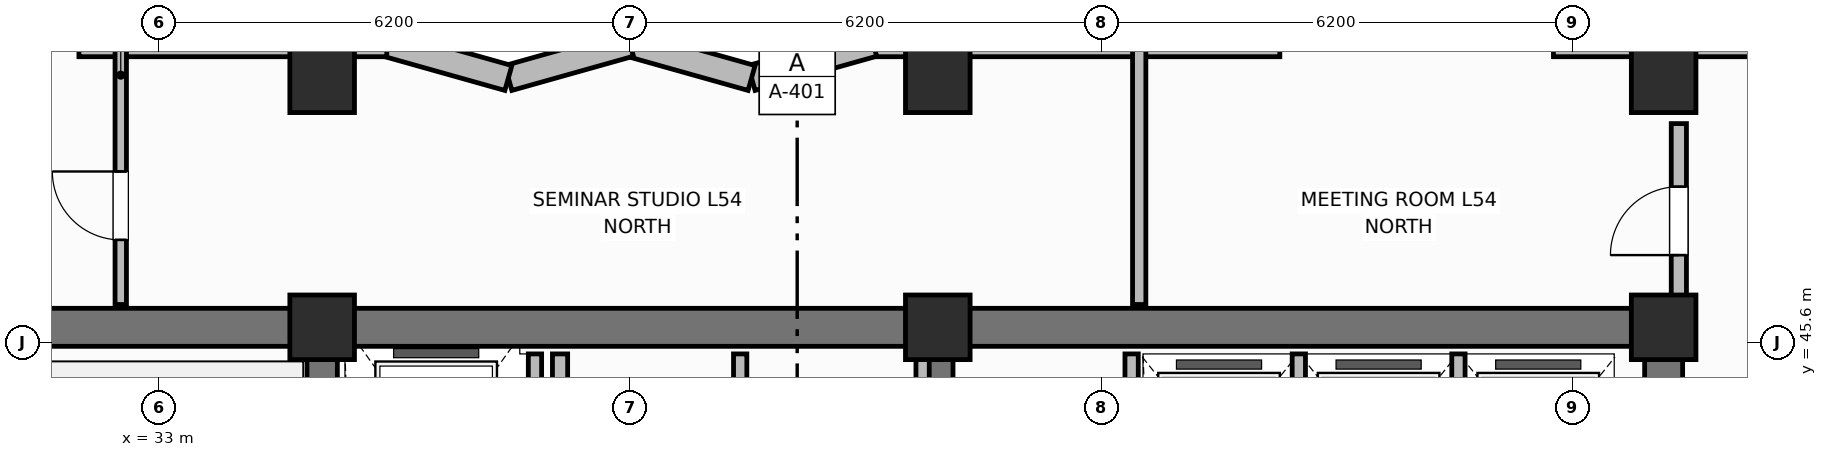
"""IFC4 building model, lengths in metres.
Left out: names, types, materials, properties, quantities, classifications, styles, units other than length and angle.
Written with IfcOpenShell. Run it as: python <this file> out.ifc"""

import sys

from ifc_helpers import new_model, si_unit, direction, frame, frame_2d, origin, origin_2d, place, context, subcontext, project, spatial, rectangle, extrude, element, fill, save


model = new_model("IFC4")
c1 = context("Model", 3, precision=1e-05, world=origin(), true_north=direction((0.0, 1.0)))
c2 = subcontext(c1, "Body", "Model", "MODEL_VIEW")
j1 = project(units=[si_unit("LENGTHUNIT", "METRE"), si_unit("PLANEANGLEUNIT", "RADIAN")], contexts=[c1])
p1 = place(None, origin())
s1 = spatial("IfcSite", under=j1, at=p1, CompositionType="ELEMENT")
p2 = place(p1, origin())
s2 = spatial("IfcBuilding", under=s1, at=p2, CompositionType="ELEMENT")
p3 = place(p2, frame((0.0, 0.0, 218.4)))
s3 = spatial("IfcBuildingStorey", under=s2, at=p3, CompositionType="ELEMENT", Elevation=218.4)
p4 = place(p3, frame((25.6, 45.8, 0.0), z_axis=(0.0, 0.0, 1.0), x_axis=(1.0, 0.0, 0.0)))
e1 = element("IfcWall", 1, at=p4, inside=s3, PredefinedType="SHEAR", context=c2, shape_type="SweptSolid", body=[
    extrude(rectangle(XDim=27.2, YDim=0.5, at=frame_2d((13.6, 0.0))), origin(), (0.0, 0.0, 1.0), 3.7),
])
p5 = place(p3, frame((52.8, 39.85, 0.0), z_axis=(0.0, 0.0, 1.0), x_axis=(0.0, 1.0, 0.0)))
e2 = element("IfcWall", 2, at=p5, inside=s3, PredefinedType="SHEAR", context=c2, shape_type="SweptSolid", body=[
    extrude(rectangle(XDim=5.7, YDim=0.5, at=frame_2d((2.85, 0.0))), origin(), (0.0, 0.0, 1.0), 3.7),
])
for number, where, z_axis, x_axis in (
    (3, (35.15, 39.85, 0.0), (0.0, 0.0, 1.0), (0.0, 1.0, 0.0)),
    (4, (43.25, 39.85, 0.0), (0.0, 0.0, 1.0), (0.0, 1.0, 0.0)),
):
    element("IfcWall", number, at=place(p3, frame(where, z_axis=z_axis, x_axis=x_axis)), inside=s3, PredefinedType="SHEAR", context=c2, shape_type="SweptSolid", body=[
        extrude(rectangle(XDim=5.7, YDim=0.4, at=frame_2d((2.85, 0.0))), origin(), (0.0, 0.0, 1.0), 3.7),
    ])
for number, where, z_axis, x_axis in (
    (5, (35.15, 45.8, 0.0), (0.0, 0.0, 1.0), (1.0, 0.0, 0.0)),
    (6, (43.25, 45.8, 0.0), (0.0, 0.0, 1.0), (1.0, 0.0, 0.0)),
    (7, (52.8, 45.8, 0.0), (0.0, 0.0, 1.0), (1.0, 0.0, 0.0)),
    (8, (35.15, 49.05, 0.0), (0.0, 0.0, 1.0), (1.0, 0.0, 0.0)),
    (9, (43.25, 49.05, 0.0), (0.0, 0.0, 1.0), (1.0, 0.0, 0.0)),
    (10, (52.8, 49.05, 0.0), (0.0, 0.0, 1.0), (1.0, 0.0, 0.0)),
):
    element("IfcColumn", number, at=place(p3, frame(where, z_axis=z_axis, x_axis=x_axis)), inside=s3, PredefinedType="COLUMN", context=c2, shape_type="SweptSolid", body=[
        extrude(rectangle(XDim=0.85, YDim=0.85, at=origin_2d()), origin(), (0.0, 0.0, 1.0), 3.7),
    ])
p6 = place(p3, frame((58.2, 49.53, 0.0), z_axis=(0.0, 0.0, 1.0), x_axis=(-1.0, 0.0, 0.0)))
e11 = element("IfcWall", 11, at=p6, inside=s3, PredefinedType="SOLIDWALL", context=c2, shape_type="SweptSolid", body=[
    extrude(rectangle(XDim=6.85, YDim=0.34, at=frame_2d((3.425, 0.0))), origin(), (0.0, 0.0, 1.0), 2.72),
])
p7 = place(p6, frame((1.675, 0.0, 0.75)))
e12 = element("IfcOpeningElement", 12, at=p7, cuts=e11, PredefinedType="OPENING", context=c2, shape_type="SweptSolid", body=[
    extrude(rectangle(XDim=1.4, YDim=1.85, at=frame_2d((0.7, 0.925))), frame((0.0, 0.18, 0.0), z_axis=(0.0, -1.0, 0.0), x_axis=(1.0, 0.0, 0.0)), (0.0, 0.0, 1.0), 0.36),
])
p8 = place(p3, frame((47.75, 49.53, 0.0), z_axis=(0.0, 0.0, 1.0), x_axis=(-1.0, 0.0, 0.0)))
e13 = element("IfcWall", 13, at=p8, inside=s3, PredefinedType="SOLIDWALL", context=c2, shape_type="SweptSolid", body=[
    extrude(rectangle(XDim=5.35, YDim=0.34, at=frame_2d((2.675, 0.0))), origin(), (0.0, 0.0, 1.0), 2.72),
])
p9 = place(p3, frame((42.4, 49.53, 0.0), z_axis=(0.0, 0.0, 1.0), x_axis=(-0.962652136636, -0.270741322725, 0.0)))
e14 = element("IfcWall", 14, at=p9, inside=s3, PredefinedType="SOLIDWALL", context=c2, shape_type="SweptSolid", body=[
    extrude(rectangle(XDim=1.662, YDim=0.34, at=frame_2d((0.831, 0.0))), origin(), (0.0, 0.0, 1.0), 2.72),
])
p10 = place(p3, frame((40.8, 49.08, 0.0), z_axis=(0.0, 0.0, 1.0), x_axis=(-0.962662902433, 0.270703040766, 0.0)))
e15 = element("IfcWall", 15, at=p10, inside=s3, PredefinedType="SOLIDWALL", context=c2, shape_type="SweptSolid", body=[
    extrude(rectangle(XDim=1.662, YDim=0.34, at=frame_2d((0.831, 0.0))), origin(), (0.0, 0.0, 1.0), 2.72),
])
p11 = place(p3, frame((39.2, 49.53, 0.0), z_axis=(0.0, 0.0, 1.0), x_axis=(-0.962652136636, -0.270741322725, 0.0)))
e16 = element("IfcWall", 16, at=p11, inside=s3, PredefinedType="SOLIDWALL", context=c2, shape_type="SweptSolid", body=[
    extrude(rectangle(XDim=1.662, YDim=0.34, at=frame_2d((0.831, 0.0))), origin(), (0.0, 0.0, 1.0), 2.72),
])
p12 = place(p3, frame((37.6, 49.08, 0.0), z_axis=(0.0, 0.0, 1.0), x_axis=(-0.962662902433, 0.270703040766, 0.0)))
e17 = element("IfcWall", 17, at=p12, inside=s3, PredefinedType="SOLIDWALL", context=c2, shape_type="SweptSolid", body=[
    extrude(rectangle(XDim=1.662, YDim=0.34, at=frame_2d((0.831, 0.0))), origin(), (0.0, 0.0, 1.0), 2.72),
])
p13 = place(p3, frame((36.0, 49.53, 0.0), z_axis=(0.0, 0.0, 1.0), x_axis=(-1.0, 0.0, 0.0)))
e18 = element("IfcWall", 18, at=p13, inside=s3, PredefinedType="SOLIDWALL", context=c2, shape_type="SweptSolid", body=[
    extrude(rectangle(XDim=4.05, YDim=0.34, at=frame_2d((2.025, 0.0))), origin(), (0.0, 0.0, 1.0), 2.72),
])
p14 = place(p3, frame((37.95, 42.6, 0.0), z_axis=(0.0, 0.0, 1.0), x_axis=(0.0, 1.0, 0.0)))
e19 = element("IfcWall", 19, at=p14, inside=s3, PredefinedType="PARTITIONING", context=c2, shape_type="SweptSolid", body=[
    extrude(rectangle(XDim=2.85, YDim=0.175, at=frame_2d((1.425, 0.0))), origin(), (0.0, 0.0, 1.0), 2.55),
])
p15 = place(p3, frame((38.28, 39.82, 0.0), z_axis=(0.0, 0.0, 1.0), x_axis=(0.0, 1.0, 0.0)))
e20 = element("IfcWall", 20, at=p15, inside=s3, PredefinedType="PARTITIONING", context=c2, shape_type="SweptSolid", body=[
    extrude(rectangle(XDim=5.63, YDim=0.2, at=frame_2d((2.815, 0.0))), origin(), (0.0, 0.0, 1.0), 2.55),
])
for number, where, z_axis, x_axis in (
    (21, (43.05, 39.82, 0.0), (0.0, 0.0, 1.0), (0.0, 1.0, 0.0)),
    (22, (40.65, 39.82, 0.0), (0.0, 0.0, 1.0), (0.0, 1.0, 0.0)),
    (23, (45.8, 39.82, 0.0), (0.0, 0.0, 1.0), (0.0, 1.0, 0.0)),
):
    element("IfcWall", number, at=place(p3, frame(where, z_axis=z_axis, x_axis=x_axis)), inside=s3, PredefinedType="PARTITIONING", context=c2, shape_type="SweptSolid", body=[
        extrude(rectangle(XDim=5.63, YDim=0.175, at=frame_2d((2.815, 0.0))), origin(), (0.0, 0.0, 1.0), 2.55),
    ])
for number, where, z_axis, x_axis in (
    (24, (48.0, 42.65, 0.0), (0.0, 0.0, 1.0), (0.0, 1.0, 0.0)),
    (25, (50.1, 42.65, 0.0), (0.0, 0.0, 1.0), (0.0, 1.0, 0.0)),
):
    element("IfcWall", number, at=place(p3, frame(where, z_axis=z_axis, x_axis=x_axis)), inside=s3, PredefinedType="PARTITIONING", context=c2, shape_type="SweptSolid", body=[
        extrude(rectangle(XDim=2.8, YDim=0.175, at=frame_2d((1.4, 0.0))), origin(), (0.0, 0.0, 1.0), 2.55),
    ])
p16 = place(p3, frame((32.5, 46.1, 0.0), z_axis=(0.0, 0.0, 1.0), x_axis=(0.0, 1.0, 0.0)))
e26 = element("IfcWall", 26, at=p16, inside=s3, PredefinedType="PARTITIONING", context=c2, shape_type="SweptSolid", body=[
    extrude(rectangle(XDim=3.43, YDim=0.15, at=frame_2d((1.715, 0.0))), origin(), (0.0, 0.0, 1.0), 2.55),
])
p17 = place(p16, frame((0.85, 0.0, 0.0)))
e27 = element("IfcOpeningElement", 27, at=p17, cuts=e26, PredefinedType="OPENING", context=c2, shape_type="SweptSolid", body=[
    extrude(rectangle(XDim=0.9, YDim=2.1, at=frame_2d((0.45, 1.05))), frame((0.0, 0.085, 0.0), z_axis=(0.0, -1.0, 0.0), x_axis=(1.0, 0.0, 0.0)), (0.0, 0.0, 1.0), 0.17),
])
p18 = place(p3, frame((45.9, 46.1, 0.0), z_axis=(0.0, 0.0, 1.0), x_axis=(0.0, 1.0, 0.0)))
e28 = element("IfcWall", 28, at=p18, inside=s3, PredefinedType="PARTITIONING", context=c2, shape_type="SweptSolid", body=[
    extrude(rectangle(XDim=3.43, YDim=0.175, at=frame_2d((1.715, 0.0))), origin(), (0.0, 0.0, 1.0), 2.55),
])
p19 = place(p3, frame((53.0, 46.1, 0.0), z_axis=(0.0, 0.0, 1.0), x_axis=(0.0, 1.0, 0.0)))
e29 = element("IfcWall", 29, at=p19, inside=s3, PredefinedType="PARTITIONING", context=c2, shape_type="SweptSolid", body=[
    extrude(rectangle(XDim=2.38, YDim=0.2, at=frame_2d((1.19, 0.0))), origin(), (0.0, 0.0, 1.0), 2.55),
])
p20 = place(p19, frame((0.65, 0.0, 0.0)))
e30 = element("IfcOpeningElement", 30, at=p20, cuts=e29, PredefinedType="OPENING", context=c2, shape_type="SweptSolid", body=[
    extrude(rectangle(XDim=0.9, YDim=2.1, at=frame_2d((0.45, 1.05))), frame((0.0, 0.11, 0.0), z_axis=(0.0, -1.0, 0.0), x_axis=(1.0, 0.0, 0.0)), (0.0, 0.0, 1.0), 0.22),
])
p21 = place(p17, origin())
e31 = element("IfcDoor", 31, at=p21, inside=s3, OperationType="SINGLE_SWING_RIGHT", PredefinedType="DOOR", context=c2, shape_type="SweptSolid", body=[
    extrude(rectangle(XDim=0.9, YDim=2.1, at=frame_2d((0.45, 1.05))), frame((0.0, 0.025, 0.0), z_axis=(0.0, -1.0, 0.0), x_axis=(1.0, 0.0, 0.0)), (0.0, 0.0, 1.0), 0.05),
])
fill(e27, e31)
p22 = place(p20, origin())
e32 = element("IfcDoor", 32, at=p22, inside=s3, OperationType="SINGLE_SWING_LEFT", PredefinedType="DOOR", context=c2, shape_type="SweptSolid", body=[
    extrude(rectangle(XDim=0.9, YDim=2.1, at=frame_2d((0.45, 1.05))), frame((0.0, 0.025, 0.0), z_axis=(0.0, -1.0, 0.0), x_axis=(1.0, 0.0, 0.0)), (0.0, 0.0, 1.0), 0.05),
])
fill(e30, e32)
save(model, sys.argv[1])
